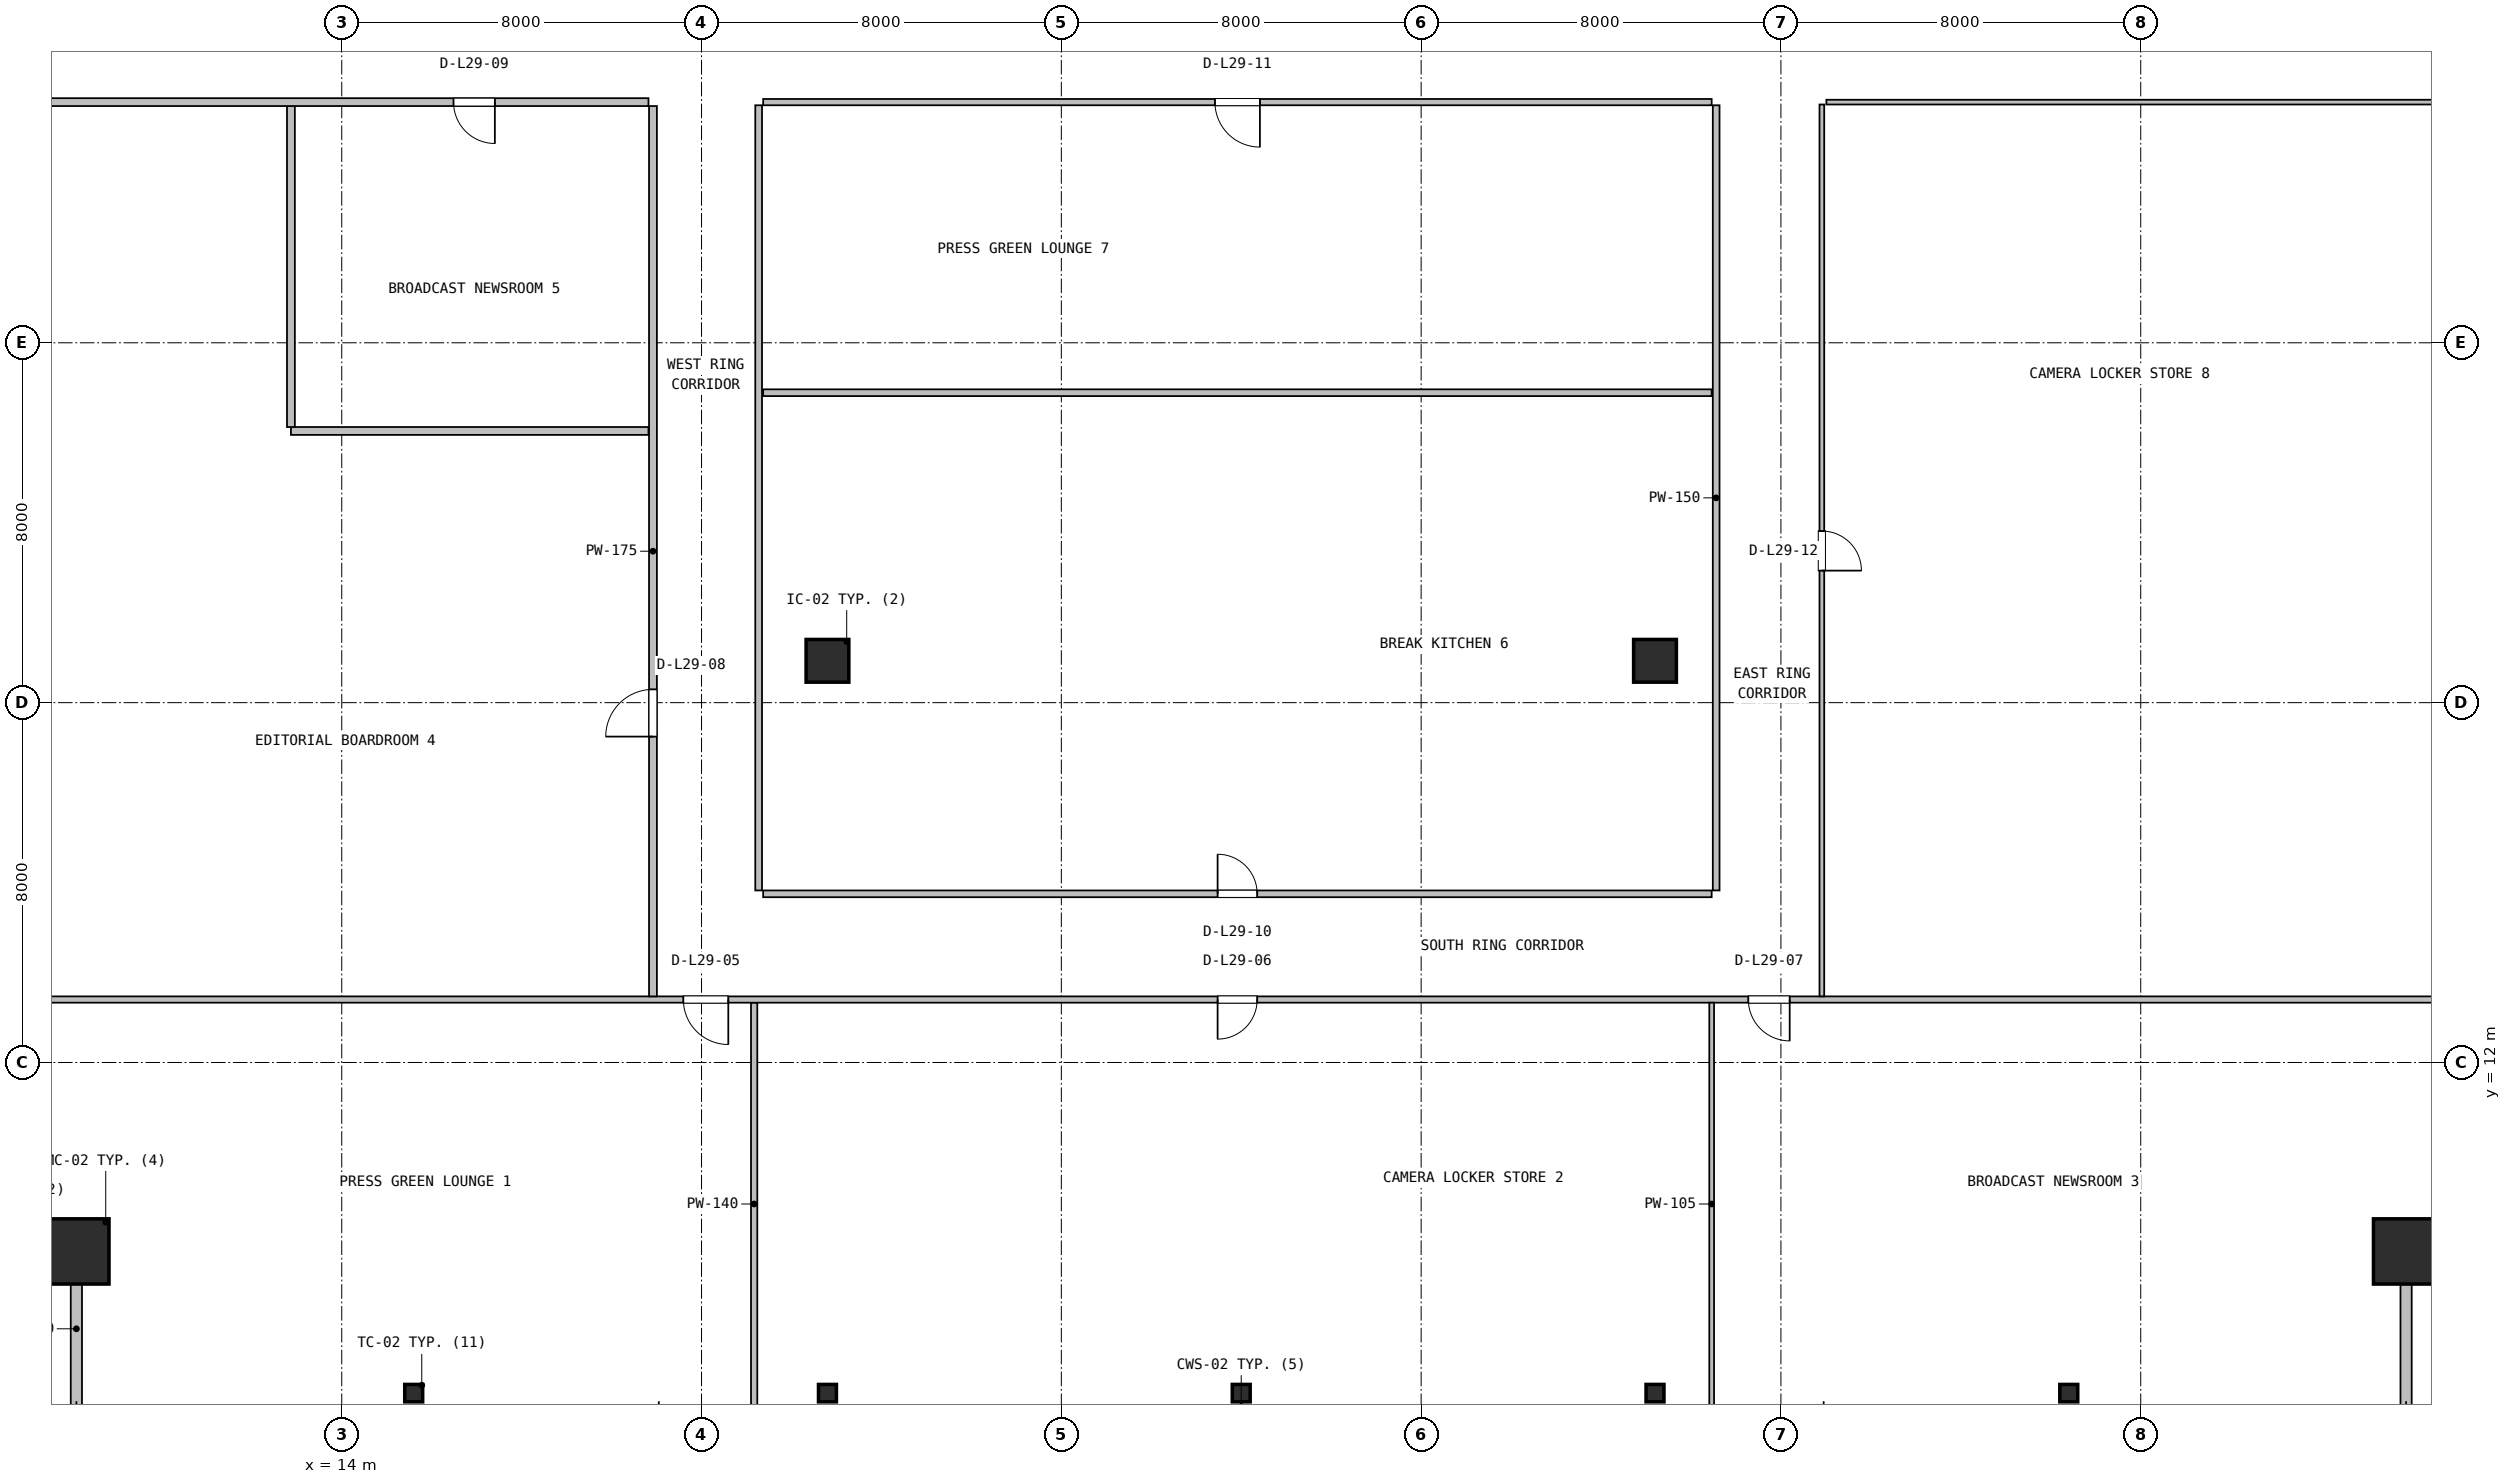
"""IFC4 building model, lengths in metres.
Left out: names, types, materials, properties, quantities, classifications, styles, units other than length and angle.
Written with IfcOpenShell. Run it as: python <this file> out.ifc"""

import sys

from ifc_helpers import new_model, si_unit, direction, frame, frame_2d, origin, origin_2d, place, context, subcontext, project, spatial, rectangle, hollow_rectangle, i_section, extrude, source, transform, mapped, element, fill, save


model = new_model("IFC4")
c1 = context("Model", 3, precision=1e-05, world=origin(), true_north=direction((0.0, 1.0)))
c2 = subcontext(c1, "Body", "Model", "MODEL_VIEW")
j1 = project(units=[si_unit("LENGTHUNIT", "METRE"), si_unit("PLANEANGLEUNIT", "RADIAN")], contexts=[c1])
p1 = place(None, origin())
s1 = spatial("IfcSite", under=j1, at=p1, CompositionType="ELEMENT")
p2 = place(p1, origin())
s2 = spatial("IfcBuilding", under=s1, at=p2, CompositionType="ELEMENT")
p3 = place(p2, frame((0.0, 0.0, 122.0)))
s3 = spatial("IfcBuildingStorey", under=s2, at=p3, CompositionType="ELEMENT", Elevation=122.0)
m1 = source(origin(), c2, "Body", "SweptSolid", [
    extrude(hollow_rectangle(XDim=1.45, YDim=1.45, WallThickness=0.055, at=origin_2d()), origin(), (0.0, 0.0, 1.0), 3.8),
])
for number, where, z_axis, x_axis in (
    (1, (8.1, 7.8, 0.0), (0.0, 0.0, 1.0), (1.0, 0.0, 0.0)),
    (2, (59.9, 7.8, 0.0), (0.0, 0.0, 1.0), (1.0, 0.0, 0.0)),
):
    element("IfcColumn", number, at=place(p3, frame(where, z_axis=z_axis, x_axis=x_axis)), inside=s3, PredefinedType="COLUMN", context=c2, shape_type="MappedRepresentation", body=[
        mapped(m1, transform((0.0, 0.0, 0.0), x_axis=(1.0, 0.0, 0.0), y_axis=(0.0, 1.0, 0.0), z_axis=(0.0, 0.0, 1.0), scale=1.0)),
    ])
m2 = source(origin(), c2, "Body", "SweptSolid", [
    extrude(i_section(OverallWidth=0.398, OverallDepth=0.387, WebThickness=0.021, FlangeThickness=0.033, FilletRadius=0.018, at=origin_2d()), origin(), (0.0, 0.0, 1.0), 3.8),
])
for number, where, z_axis, x_axis in (
    (3, (15.6, 4.65, 0.0), (0.0, 0.0, 1.0), (1.0, 0.0, 0.0)),
    (4, (24.8, 4.65, 0.0), (0.0, 0.0, 1.0), (1.0, 0.0, 0.0)),
    (5, (34.0, 4.65, 0.0), (0.0, 0.0, 1.0), (1.0, 0.0, 0.0)),
    (6, (43.2, 4.65, 0.0), (0.0, 0.0, 1.0), (1.0, 0.0, 0.0)),
    (7, (52.4, 4.65, 0.0), (0.0, 0.0, 1.0), (1.0, 0.0, 0.0)),
):
    element("IfcColumn", number, at=place(p3, frame(where, z_axis=z_axis, x_axis=x_axis)), inside=s3, PredefinedType="COLUMN", context=c2, shape_type="MappedRepresentation", body=[
        mapped(m2, transform((0.0, 0.0, 0.0), x_axis=(1.0, 0.0, 0.0), y_axis=(0.0, 1.0, 0.0), z_axis=(0.0, 0.0, 1.0), scale=1.0)),
    ])
m3 = source(origin(), c2, "Body", "SweptSolid", [
    extrude(rectangle(XDim=0.95, YDim=0.95, at=origin_2d()), origin(), (0.0, 0.0, 1.0), 3.8),
])
for number, where, z_axis, x_axis in (
    (8, (24.8, 20.93, 0.0), (0.0, 0.0, 1.0), (1.0, 0.0, 0.0)),
    (9, (43.2, 20.93, 0.0), (0.0, 0.0, 1.0), (1.0, 0.0, 0.0)),
):
    element("IfcColumn", number, at=place(p3, frame(where, z_axis=z_axis, x_axis=x_axis)), inside=s3, PredefinedType="COLUMN", context=c2, shape_type="MappedRepresentation", body=[
        mapped(m3, transform((0.0, 0.0, 0.0), x_axis=(1.0, 0.0, 0.0), y_axis=(0.0, 1.0, 0.0), z_axis=(0.0, 0.0, 1.0), scale=1.0)),
    ])
for number, where, z_axis, x_axis in (
    (10, (8.1, 4.28, 0.0), (0.0, 0.0, 1.0), (0.0, 1.0, 0.0)),
    (11, (59.9, 4.28, 0.0), (0.0, 0.0, 1.0), (0.0, 1.0, 0.0)),
):
    element("IfcWall", number, at=place(p3, frame(where, z_axis=z_axis, x_axis=x_axis)), inside=s3, PredefinedType="SOLIDWALL", context=c2, shape_type="SweptSolid", body=[
        extrude(rectangle(XDim=3.6, YDim=0.25, at=frame_2d((1.8, 0.0))), origin(), (0.0, 0.0, 1.0), 3.108),
    ])
p4 = place(p3, frame((23.17, 4.38, 0.0), z_axis=(0.0, 0.0, 1.0), x_axis=(0.0, 1.0, 0.0)))
e12 = element("IfcWall", 12, at=p4, inside=s3, PredefinedType="PARTITIONING", context=c2, shape_type="SweptSolid", body=[
    extrude(rectangle(XDim=8.95, YDim=0.14, at=frame_2d((4.475, 0.0))), origin(), (0.0, 0.0, 1.0), 3.108),
])
p5 = place(p3, frame((4.68, 13.4, 0.0), z_axis=(0.0, 0.0, 1.0), x_axis=(1.0, 0.0, 0.0)))
e13 = element("IfcWall", 13, at=p5, inside=s3, PredefinedType="PARTITIONING", context=c2, shape_type="SweptSolid", body=[
    extrude(rectangle(XDim=58.64, YDim=0.14, at=frame_2d((29.32, 0.0))), origin(), (0.0, 0.0, 1.0), 2.83),
])
p6 = place(p5, frame((16.915, 0.0, 0.0)))
e14 = element("IfcOpeningElement", 14, at=p6, cuts=e13, PredefinedType="OPENING", context=c2, shape_type="SweptSolid", body=[
    extrude(rectangle(XDim=1.0, YDim=2.1, at=frame_2d((0.5, 1.05))), frame((0.0, 0.08, 0.0), z_axis=(0.0, -1.0, 0.0), x_axis=(1.0, 0.0, 0.0)), (0.0, 0.0, 1.0), 0.16),
])
p7 = place(p5, frame((28.795, 0.0, 0.0)))
e15 = element("IfcOpeningElement", 15, at=p7, cuts=e13, PredefinedType="OPENING", context=c2, shape_type="SweptSolid", body=[
    extrude(rectangle(XDim=0.88, YDim=2.06, at=frame_2d((0.44, 1.03))), frame((0.0, 0.08, 0.0), z_axis=(0.0, -1.0, 0.0), x_axis=(1.0, 0.0, 0.0)), (0.0, 0.0, 1.0), 0.16),
])
p8 = place(p5, frame((40.595, 0.0, 0.0)))
e16 = element("IfcOpeningElement", 16, at=p8, cuts=e13, PredefinedType="OPENING", context=c2, shape_type="SweptSolid", body=[
    extrude(rectangle(XDim=0.92, YDim=2.08, at=frame_2d((0.46, 1.04))), frame((0.0, 0.08, 0.0), z_axis=(0.0, -1.0, 0.0), x_axis=(1.0, 0.0, 0.0)), (0.0, 0.0, 1.0), 0.16),
])
p9 = place(p3, frame((44.46, 4.38, 0.0), z_axis=(0.0, 0.0, 1.0), x_axis=(0.0, 1.0, 0.0)))
e17 = element("IfcWall", 17, at=p9, inside=s3, PredefinedType="PARTITIONING", context=c2, shape_type="SweptSolid", body=[
    extrude(rectangle(XDim=8.95, YDim=0.105, at=frame_2d((4.475, 0.0))), origin(), (0.0, 0.0, 1.0), 3.108),
])
p10 = place(p3, frame((20.92, 13.47, 0.0), z_axis=(0.0, 0.0, 1.0), x_axis=(0.0, 1.0, 0.0)))
e18 = element("IfcWall", 18, at=p10, inside=s3, PredefinedType="PARTITIONING", context=c2, shape_type="SweptSolid", body=[
    extrude(rectangle(XDim=19.793, YDim=0.175, at=frame_2d((9.896, 0.0))), origin(), (0.0, 0.0, 1.0), 3.222),
])
p11 = place(p10, frame((5.775, 0.0, 0.0)))
e19 = element("IfcOpeningElement", 19, at=p11, cuts=e18, PredefinedType="OPENING", context=c2, shape_type="SweptSolid", body=[
    extrude(rectangle(XDim=1.05, YDim=2.1, at=frame_2d((0.525, 1.05))), frame((0.0, 0.098, 0.0), z_axis=(0.0, -1.0, 0.0), x_axis=(1.0, 0.0, 0.0)), (0.0, 0.0, 1.0), 0.195),
])
p12 = place(p3, frame((12.87, 26.04, 0.0), z_axis=(0.0, 0.0, 1.0), x_axis=(1.0, 0.0, 0.0)))
e20 = element("IfcWall", 20, at=p12, inside=s3, PredefinedType="PARTITIONING", context=c2, shape_type="SweptSolid", body=[
    extrude(rectangle(XDim=7.95, YDim=0.175, at=frame_2d((3.975, 0.0))), origin(), (0.0, 0.0, 1.0), 3.222),
])
p13 = place(p3, frame((12.87, 26.127, 0.0), z_axis=(0.0, 0.0, 1.0), x_axis=(0.0, 1.0, 0.0)))
e21 = element("IfcWall", 21, at=p13, inside=s3, PredefinedType="PARTITIONING", context=c2, shape_type="SweptSolid", body=[
    extrude(rectangle(XDim=7.136, YDim=0.175, at=frame_2d((3.568, 0.0))), origin(), (0.0, 0.0, 1.0), 3.222),
])
p14 = place(p3, frame((4.68, 33.35, 0.0), z_axis=(0.0, 0.0, 1.0), x_axis=(1.0, 0.0, 0.0)))
e22 = element("IfcWall", 22, at=p14, inside=s3, PredefinedType="PARTITIONING", context=c2, shape_type="SweptSolid", body=[
    extrude(rectangle(XDim=16.14, YDim=0.175, at=frame_2d((8.07, 0.0))), origin(), (0.0, 0.0, 1.0), 3.108),
])
p15 = place(p14, frame((11.805, 0.0, 0.0)))
e23 = element("IfcOpeningElement", 23, at=p15, cuts=e22, PredefinedType="OPENING", context=c2, shape_type="SweptSolid", body=[
    extrude(rectangle(XDim=0.92, YDim=2.08, at=frame_2d((0.46, 1.04))), frame((0.0, 0.098, 0.0), z_axis=(0.0, -1.0, 0.0), x_axis=(1.0, 0.0, 0.0)), (0.0, 0.0, 1.0), 0.195),
])
p16 = place(p3, frame((23.37, 15.75, 0.0), z_axis=(0.0, 0.0, 1.0), x_axis=(1.0, 0.0, 0.0)))
e24 = element("IfcWall", 24, at=p16, inside=s3, PredefinedType="PARTITIONING", context=c2, shape_type="SweptSolid", body=[
    extrude(rectangle(XDim=21.09, YDim=0.15, at=frame_2d((10.545, 0.0))), origin(), (0.0, 0.0, 1.0), 2.83),
])
p17 = place(p16, frame((10.105, 0.0, 0.0)))
e25 = element("IfcOpeningElement", 25, at=p17, cuts=e24, PredefinedType="OPENING", context=c2, shape_type="SweptSolid", body=[
    extrude(rectangle(XDim=0.88, YDim=2.06, at=frame_2d((0.44, 1.03))), frame((0.0, 0.085, 0.0), z_axis=(0.0, -1.0, 0.0), x_axis=(1.0, 0.0, 0.0)), (0.0, 0.0, 1.0), 0.17),
])
p18 = place(p3, frame((44.56, 15.825, 0.0), z_axis=(0.0, 0.0, 1.0), x_axis=(0.0, 1.0, 0.0)))
e26 = element("IfcWall", 26, at=p18, inside=s3, PredefinedType="PARTITIONING", context=c2, shape_type="SweptSolid", body=[
    extrude(rectangle(XDim=17.455, YDim=0.15, at=frame_2d((8.728, 0.0))), origin(), (0.0, 0.0, 1.0), 3.222),
])
p19 = place(p3, frame((23.37, 26.89, 0.0), z_axis=(0.0, 0.0, 1.0), x_axis=(1.0, 0.0, 0.0)))
e27 = element("IfcWall", 27, at=p19, inside=s3, PredefinedType="PARTITIONING", context=c2, shape_type="SweptSolid", body=[
    extrude(rectangle(XDim=21.09, YDim=0.15, at=frame_2d((10.545, 0.0))), origin(), (0.0, 0.0, 1.0), 2.83),
])
p20 = place(p3, frame((23.27, 15.825, 0.0), z_axis=(0.0, 0.0, 1.0), x_axis=(0.0, 1.0, 0.0)))
e28 = element("IfcWall", 28, at=p20, inside=s3, PredefinedType="PARTITIONING", context=c2, shape_type="SweptSolid", body=[
    extrude(rectangle(XDim=17.455, YDim=0.15, at=frame_2d((8.728, 0.0))), origin(), (0.0, 0.0, 1.0), 3.222),
])
p21 = place(p3, frame((23.37, 33.35, 0.0), z_axis=(0.0, 0.0, 1.0), x_axis=(1.0, 0.0, 0.0)))
e29 = element("IfcWall", 29, at=p21, inside=s3, PredefinedType="PARTITIONING", context=c2, shape_type="SweptSolid", body=[
    extrude(rectangle(XDim=21.09, YDim=0.14, at=frame_2d((10.545, 0.0))), origin(), (0.0, 0.0, 1.0), 2.83),
])
p22 = place(p21, frame((10.045, 0.0, 0.0)))
e30 = element("IfcOpeningElement", 30, at=p22, cuts=e29, PredefinedType="OPENING", context=c2, shape_type="SweptSolid", body=[
    extrude(rectangle(XDim=1.0, YDim=2.1, at=frame_2d((0.5, 1.05))), frame((0.0, 0.08, 0.0), z_axis=(0.0, -1.0, 0.0), x_axis=(1.0, 0.0, 0.0)), (0.0, 0.0, 1.0), 0.16),
])
p23 = place(p3, frame((47.01, 33.35, 0.0), z_axis=(0.0, 0.0, 1.0), x_axis=(1.0, 0.0, 0.0)))
e31 = element("IfcWall", 31, at=p23, inside=s3, PredefinedType="PARTITIONING", context=c2, shape_type="SweptSolid", body=[
    extrude(rectangle(XDim=16.31, YDim=0.105, at=frame_2d((8.155, 0.0))), origin(), (0.0, 0.0, 1.0), 3.108),
])
p24 = place(p3, frame((46.91, 13.47, 0.0), z_axis=(0.0, 0.0, 1.0), x_axis=(0.0, 1.0, 0.0)))
e32 = element("IfcWall", 32, at=p24, inside=s3, PredefinedType="PARTITIONING", context=c2, shape_type="SweptSolid", body=[
    extrude(rectangle(XDim=19.827, YDim=0.105, at=frame_2d((9.914, 0.0))), origin(), (0.0, 0.0, 1.0), 3.222),
])
p25 = place(p24, frame((9.465, 0.0, 0.0)))
e33 = element("IfcOpeningElement", 33, at=p25, cuts=e32, PredefinedType="OPENING", context=c2, shape_type="SweptSolid", body=[
    extrude(rectangle(XDim=0.88, YDim=2.06, at=frame_2d((0.44, 1.03))), frame((0.0, 0.062, 0.0), z_axis=(0.0, -1.0, 0.0), x_axis=(1.0, 0.0, 0.0)), (0.0, 0.0, 1.0), 0.125),
])
m4 = source(origin(), c2, "Body", "SweptSolid", [
    extrude(rectangle(XDim=1.0, YDim=2.1, at=frame_2d((0.5, 1.05))), frame((0.0, 0.025, 0.0), z_axis=(0.0, -1.0, 0.0), x_axis=(1.0, 0.0, 0.0)), (0.0, 0.0, 1.0), 0.05),
])
p26 = place(p6, frame((1.0, 0.0, 0.0), z_axis=(0.0, 0.0, 1.0), x_axis=(-1.0, 0.0, 0.0)))
e34 = element("IfcDoor", 34, at=p26, inside=s3, OperationType="SINGLE_SWING_RIGHT", PredefinedType="DOOR", context=c2, shape_type="MappedRepresentation", body=[
    mapped(m4, transform((0.0, 0.0, 0.0), x_axis=(1.0, 0.0, 0.0), y_axis=(0.0, 1.0, 0.0), z_axis=(0.0, 0.0, 1.0), scale=1.0)),
])
fill(e14, e34)
m5 = source(origin(), c2, "Body", "SweptSolid", [
    extrude(rectangle(XDim=0.88, YDim=2.06, at=frame_2d((0.44, 1.03))), frame((0.0, 0.025, 0.0), z_axis=(0.0, -1.0, 0.0), x_axis=(1.0, 0.0, 0.0)), (0.0, 0.0, 1.0), 0.05),
])
p27 = place(p7, frame((0.88, 0.0, 0.0), z_axis=(0.0, 0.0, 1.0), x_axis=(-1.0, 0.0, 0.0)))
e35 = element("IfcDoor", 35, at=p27, inside=s3, OperationType="SINGLE_SWING_LEFT", PredefinedType="DOOR", context=c2, shape_type="MappedRepresentation", body=[
    mapped(m5, transform((0.0, 0.0, 0.0), x_axis=(1.0, 0.0, 0.0), y_axis=(0.0, 1.0, 0.0), z_axis=(0.0, 0.0, 1.0), scale=1.0)),
])
fill(e15, e35)
m6 = source(origin(), c2, "Body", "SweptSolid", [
    extrude(rectangle(XDim=0.92, YDim=2.08, at=frame_2d((0.46, 1.04))), frame((0.0, 0.025, 0.0), z_axis=(0.0, -1.0, 0.0), x_axis=(1.0, 0.0, 0.0)), (0.0, 0.0, 1.0), 0.05),
])
p28 = place(p8, frame((0.92, 0.0, 0.0), z_axis=(0.0, 0.0, 1.0), x_axis=(-1.0, 0.0, 0.0)))
e36 = element("IfcDoor", 36, at=p28, inside=s3, OperationType="SINGLE_SWING_RIGHT", PredefinedType="DOOR", context=c2, shape_type="MappedRepresentation", body=[
    mapped(m6, transform((0.0, 0.0, 0.0), x_axis=(1.0, 0.0, 0.0), y_axis=(0.0, 1.0, 0.0), z_axis=(0.0, 0.0, 1.0), scale=1.0)),
])
fill(e16, e36)
m7 = source(origin(), c2, "Body", "SweptSolid", [
    extrude(rectangle(XDim=1.05, YDim=2.1, at=frame_2d((0.525, 1.05))), frame((0.0, 0.025, 0.0), z_axis=(0.0, -1.0, 0.0), x_axis=(1.0, 0.0, 0.0)), (0.0, 0.0, 1.0), 0.05),
])
p29 = place(p11, origin())
e37 = element("IfcDoor", 37, at=p29, inside=s3, OperationType="SINGLE_SWING_LEFT", PredefinedType="DOOR", context=c2, shape_type="MappedRepresentation", body=[
    mapped(m7, transform((0.0, 0.0, 0.0), x_axis=(1.0, 0.0, 0.0), y_axis=(0.0, 1.0, 0.0), z_axis=(0.0, 0.0, 1.0), scale=1.0)),
])
fill(e19, e37)
p30 = place(p15, frame((0.92, 0.0, 0.0), z_axis=(0.0, 0.0, 1.0), x_axis=(-1.0, 0.0, 0.0)))
e38 = element("IfcDoor", 38, at=p30, inside=s3, OperationType="SINGLE_SWING_RIGHT", PredefinedType="DOOR", context=c2, shape_type="MappedRepresentation", body=[
    mapped(m6, transform((0.0, 0.0, 0.0), x_axis=(1.0, 0.0, 0.0), y_axis=(0.0, 1.0, 0.0), z_axis=(0.0, 0.0, 1.0), scale=1.0)),
])
fill(e23, e38)
p31 = place(p17, origin())
e39 = element("IfcDoor", 39, at=p31, inside=s3, OperationType="SINGLE_SWING_LEFT", PredefinedType="DOOR", context=c2, shape_type="MappedRepresentation", body=[
    mapped(m5, transform((0.0, 0.0, 0.0), x_axis=(1.0, 0.0, 0.0), y_axis=(0.0, 1.0, 0.0), z_axis=(0.0, 0.0, 1.0), scale=1.0)),
])
fill(e25, e39)
p32 = place(p22, frame((1.0, 0.0, 0.0), z_axis=(0.0, 0.0, 1.0), x_axis=(-1.0, 0.0, 0.0)))
e40 = element("IfcDoor", 40, at=p32, inside=s3, OperationType="SINGLE_SWING_RIGHT", PredefinedType="DOOR", context=c2, shape_type="MappedRepresentation", body=[
    mapped(m4, transform((0.0, 0.0, 0.0), x_axis=(1.0, 0.0, 0.0), y_axis=(0.0, 1.0, 0.0), z_axis=(0.0, 0.0, 1.0), scale=1.0)),
])
fill(e30, e40)
p33 = place(p25, frame((0.88, 0.0, 0.0), z_axis=(0.0, 0.0, 1.0), x_axis=(-1.0, 0.0, 0.0)))
e41 = element("IfcDoor", 41, at=p33, inside=s3, OperationType="SINGLE_SWING_LEFT", PredefinedType="DOOR", context=c2, shape_type="MappedRepresentation", body=[
    mapped(m5, transform((0.0, 0.0, 0.0), x_axis=(1.0, 0.0, 0.0), y_axis=(0.0, 1.0, 0.0), z_axis=(0.0, 0.0, 1.0), scale=1.0)),
])
fill(e33, e41)
save(model, sys.argv[1])
